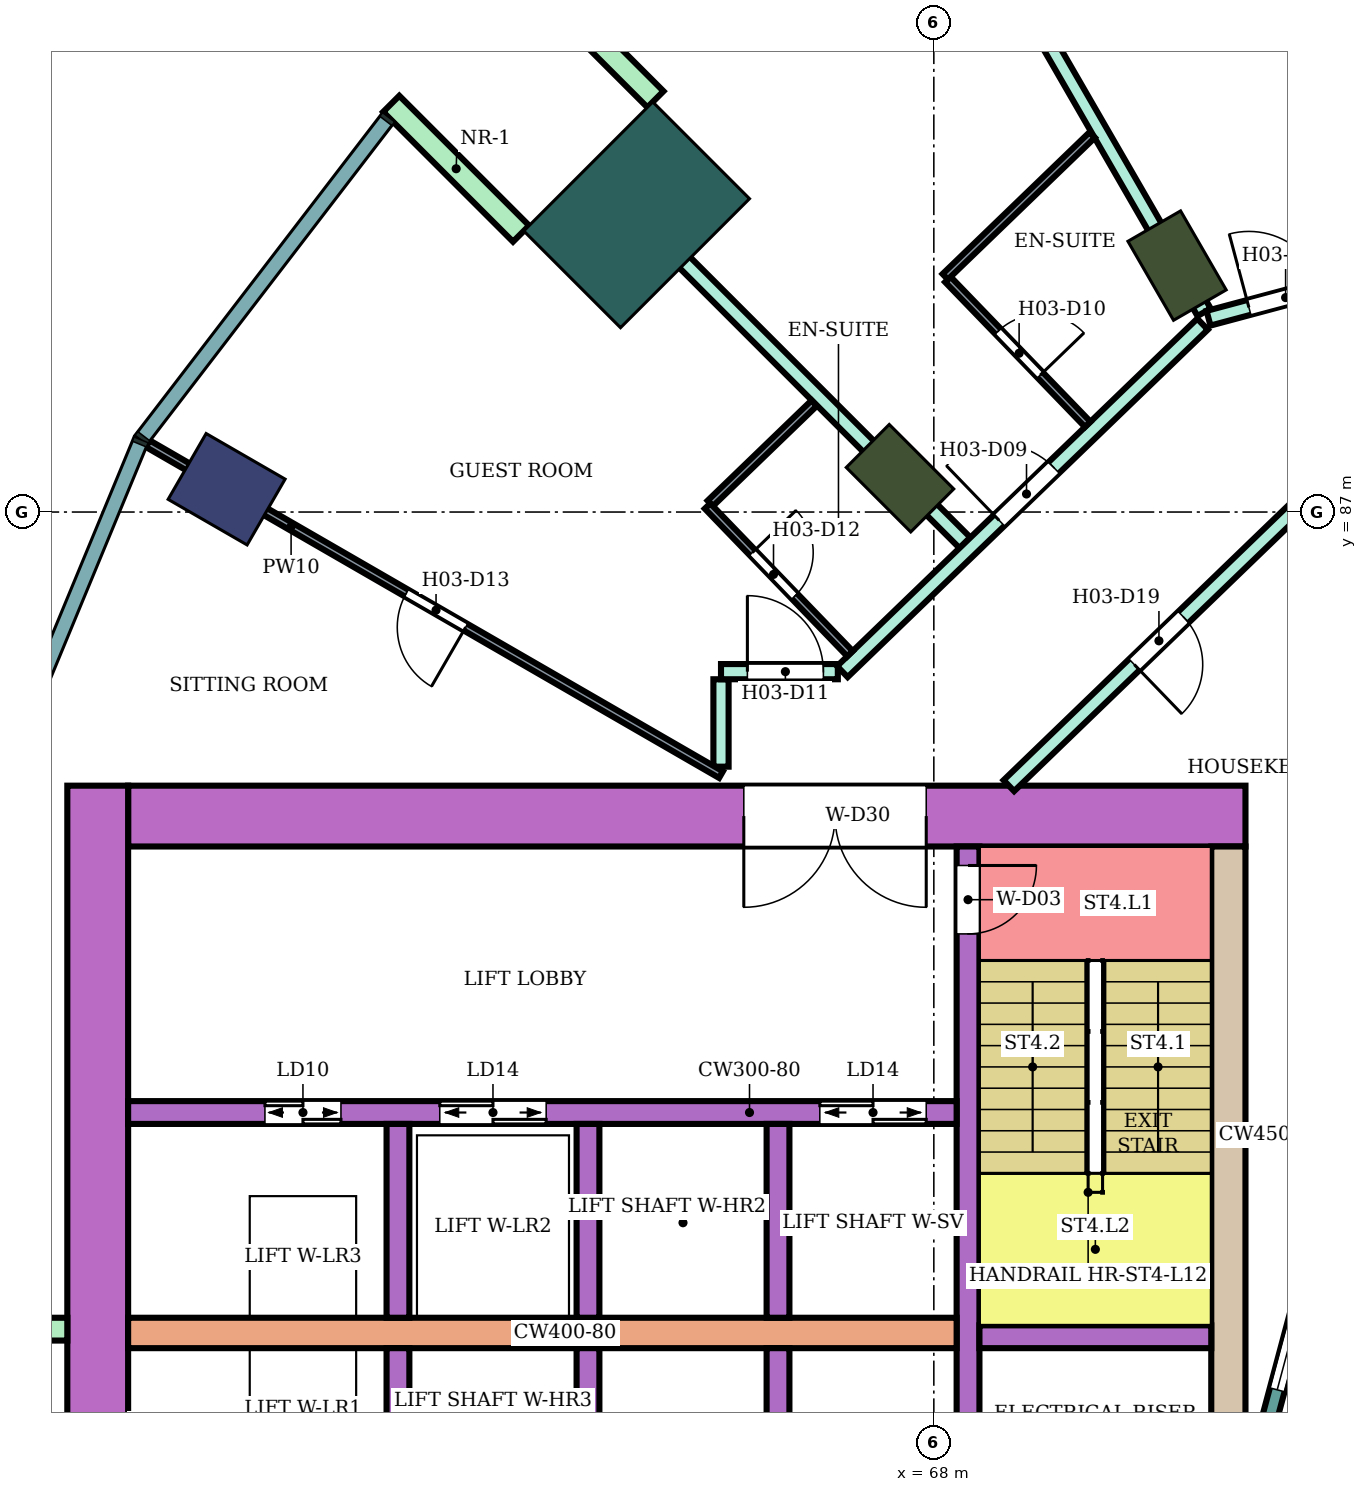
"""IFC4 building model, lengths in metres.
Left out: names, types, materials, properties, quantities, classifications, styles, units other than length and angle.
Written with IfcOpenShell. Run it as: python <this file> out.ifc"""

import sys

from ifc_helpers import new_model, si_unit, direction, frame, frame_2d, origin, origin_2d, place, context, subcontext, project, spatial, rectangle, extrude, element, fill, save


model = new_model("IFC4")
c1 = context("Model", 3, precision=1e-05, world=origin(), true_north=direction((0.0, 1.0)))
c2 = subcontext(c1, "Body", "Model", "MODEL_VIEW")
j1 = project(units=[si_unit("LENGTHUNIT", "METRE"), si_unit("PLANEANGLEUNIT", "RADIAN")], contexts=[c1])
p1 = place(None, origin())
s1 = spatial("IfcSite", under=j1, at=p1, CompositionType="ELEMENT")
p2 = place(p1, origin())
s2 = spatial("IfcBuilding", under=s1, at=p2, CompositionType="ELEMENT")
p3 = place(p2, frame((0.0, 0.0, 55.4)))
s3 = spatial("IfcBuildingStorey", under=s2, at=p3, CompositionType="ELEMENT", Elevation=55.4)
p4 = place(p3, frame((58.696, 87.3, 0.0), z_axis=(0.0, 0.0, 1.0), x_axis=(-0.866025403784, 0.5, 0.0)))
e1 = element("IfcColumn", 1, at=p4, inside=s3, PredefinedType="COLUMN", context=c2, shape_type="SweptSolid", body=[
    extrude(rectangle(XDim=1.2, YDim=1.0, at=origin_2d()), origin(), (0.0, 0.0, 1.0), 3.8),
])
for number, where, z_axis, x_axis in (
    (2, (71.2, 90.242, 0.0), (0.0, 0.0, 1.0), (-0.5, 0.866, 0.0)),
    (3, (67.555, 87.445, 0.0), (0.0, 0.0, 1.0), (-0.707, 0.707, 0.0)),
):
    element("IfcColumn", number, at=place(p3, frame(where, z_axis=z_axis, x_axis=x_axis)), inside=s3, PredefinedType="COLUMN", context=c2, shape_type="SweptSolid", body=[
        extrude(rectangle(XDim=1.2, YDim=0.8, at=origin_2d()), origin(), (0.0, 0.0, 1.0), 3.8),
    ])
p5 = place(p3, frame((64.09, 90.91, 0.0), z_axis=(0.0, 0.0, 1.0), x_axis=(-0.707106781187, 0.707106781187, 0.0)))
e4 = element("IfcColumn", 4, at=p5, inside=s3, PredefinedType="COLUMN", context=c2, shape_type="SweptSolid", body=[
    extrude(rectangle(XDim=1.8, YDim=2.4, at=origin_2d()), origin(), (0.0, 0.0, 1.0), 3.8),
])
p6 = place(p3, frame((72.1, 83.0, 0.0), z_axis=(0.0, 0.0, 1.0), x_axis=(-1.0, 0.0, 0.0)))
e5 = element("IfcWall", 5, at=p6, inside=s3, PredefinedType="SHEAR", context=c2, shape_type="SweptSolid", body=[
    extrude(rectangle(XDim=14.7, YDim=0.8, at=frame_2d((7.35, 0.0))), origin(), (0.0, 0.0, 1.0), 3.48),
])
p7 = place(p6, frame((4.2, 0.0, 0.0)))
e6 = element("IfcOpeningElement", 6, at=p7, cuts=e5, PredefinedType="OPENING", context=c2, shape_type="SweptSolid", body=[
    extrude(rectangle(XDim=2.4, YDim=2.4, at=frame_2d((1.2, 1.2))), frame((0.0, 0.41, 0.0), z_axis=(0.0, -1.0, 0.0), x_axis=(1.0, 0.0, 0.0)), (0.0, 0.0, 1.0), 0.82),
])
p8 = place(p3, frame((71.875, 82.6, 0.0), z_axis=(0.0, 0.0, 1.0), x_axis=(0.0, -1.0, 0.0)))
e7 = element("IfcWall", 7, at=p8, inside=s3, PredefinedType="SHEAR", context=c2, shape_type="SweptSolid", body=[
    extrude(rectangle(XDim=7.6, YDim=0.45, at=frame_2d((3.8, 0.0))), origin(), (0.0, 0.0, 1.0), 3.48),
])
p9 = place(p3, frame((57.0, 83.4, 0.0), z_axis=(0.0, 0.0, 1.0), x_axis=(0.0, -1.0, 0.0)))
e8 = element("IfcWall", 8, at=p9, inside=s3, PredefinedType="SHEAR", context=c2, shape_type="SweptSolid", body=[
    extrude(rectangle(XDim=16.8, YDim=0.8, at=frame_2d((8.4, 0.0))), origin(), (0.0, 0.0, 1.0), 3.48),
])
p10 = place(p3, frame((68.45, 82.6, 0.0), z_axis=(0.0, 0.0, 1.0), x_axis=(0.0, -1.0, 0.0)))
e9 = element("IfcWall", 9, at=p10, inside=s3, PredefinedType="SHEAR", context=c2, shape_type="SweptSolid", body=[
    extrude(rectangle(XDim=7.6, YDim=0.3, at=frame_2d((3.8, 0.0))), origin(), (0.0, 0.0, 1.0), 3.48),
])
p11 = place(p10, frame((0.25, 0.0, 0.0)))
e10 = element("IfcOpeningElement", 10, at=p11, cuts=e9, PredefinedType="OPENING", context=c2, shape_type="SweptSolid", body=[
    extrude(rectangle(XDim=0.9, YDim=2.1, at=frame_2d((0.45, 1.05))), frame((0.0, 0.16, 0.0), z_axis=(0.0, -1.0, 0.0), x_axis=(1.0, 0.0, 0.0)), (0.0, 0.0, 1.0), 0.32),
])
p12 = place(p3, frame((71.65, 76.15, 0.0), z_axis=(0.0, 0.0, 1.0), x_axis=(-1.0, 0.0, 0.0)))
e11 = element("IfcWall", 11, at=p12, inside=s3, PredefinedType="SHEAR", context=c2, shape_type="SweptSolid", body=[
    extrude(rectangle(XDim=3.05, YDim=0.3, at=frame_2d((1.525, 0.0))), origin(), (0.0, 0.0, 1.0), 3.48),
])
p13 = place(p3, frame((68.3, 76.2, 0.0), z_axis=(0.0, 0.0, 1.0), x_axis=(-1.0, 0.0, 0.0)))
e12 = element("IfcWall", 12, at=p13, inside=s3, PredefinedType="SHEAR", context=c2, shape_type="SweptSolid", body=[
    extrude(rectangle(XDim=10.9, YDim=0.4, at=frame_2d((5.45, 0.0))), origin(), (0.0, 0.0, 1.0), 3.48),
])
p14 = place(p3, frame((68.3, 79.1, 0.0), z_axis=(0.0, 0.0, 1.0), x_axis=(-1.0, 0.0, 0.0)))
e13 = element("IfcWall", 13, at=p14, inside=s3, PredefinedType="SHEAR", context=c2, shape_type="SweptSolid", body=[
    extrude(rectangle(XDim=10.9, YDim=0.3, at=frame_2d((5.45, 0.0))), origin(), (0.0, 0.0, 1.0), 3.48),
])
p15 = place(p14, frame((0.4, 0.0, 0.0)))
e14 = element("IfcOpeningElement", 14, at=p15, cuts=e13, PredefinedType="OPENING", context=c2, shape_type="SweptSolid", body=[
    extrude(rectangle(XDim=1.4, YDim=2.1, at=frame_2d((0.7, 1.05))), frame((0.0, 0.16, 0.0), z_axis=(0.0, -1.0, 0.0), x_axis=(1.0, 0.0, 0.0)), (0.0, 0.0, 1.0), 0.32),
])
p16 = place(p14, frame((5.4, 0.0, 0.0)))
e15 = element("IfcOpeningElement", 15, at=p16, cuts=e13, PredefinedType="OPENING", context=c2, shape_type="SweptSolid", body=[
    extrude(rectangle(XDim=1.4, YDim=2.1, at=frame_2d((0.7, 1.05))), frame((0.0, 0.16, 0.0), z_axis=(0.0, -1.0, 0.0), x_axis=(1.0, 0.0, 0.0)), (0.0, 0.0, 1.0), 0.32),
])
p17 = place(p14, frame((8.1, 0.0, 0.0)))
e16 = element("IfcOpeningElement", 16, at=p17, cuts=e13, PredefinedType="OPENING", context=c2, shape_type="SweptSolid", body=[
    extrude(rectangle(XDim=1.0, YDim=2.1, at=frame_2d((0.5, 1.05))), frame((0.0, 0.16, 0.0), z_axis=(0.0, -1.0, 0.0), x_axis=(1.0, 0.0, 0.0)), (0.0, 0.0, 1.0), 0.32),
])
for number, where, z_axis, x_axis in (
    (17, (65.95, 76.0, 0.0), (0.0, 0.0, 1.0), (0.0, -1.0, 0.0)),
    (18, (63.45, 76.0, 0.0), (0.0, 0.0, 1.0), (0.0, -1.0, 0.0)),
    (19, (60.95, 76.0, 0.0), (0.0, 0.0, 1.0), (0.0, -1.0, 0.0)),
    (20, (65.95, 78.95, 0.0), (0.0, 0.0, 1.0), (0.0, -1.0, 0.0)),
    (21, (63.45, 78.95, 0.0), (0.0, 0.0, 1.0), (0.0, -1.0, 0.0)),
    (22, (60.95, 78.95, 0.0), (0.0, 0.0, 1.0), (0.0, -1.0, 0.0)),
):
    element("IfcWall", number, at=place(p3, frame(where, z_axis=z_axis, x_axis=x_axis)), inside=s3, PredefinedType="SHEAR", context=c2, shape_type="SweptSolid", body=[
        extrude(rectangle(XDim=2.55, YDim=0.3, at=frame_2d((1.275, 0.0))), origin(), (0.0, 0.0, 1.0), 3.48),
    ])
for number, where, z_axis, x_axis in (
    (23, (64.338, 92.43, 0.0), (0.0, 0.0, 1.0), (-0.707, 0.707, 0.0)),
    (24, (62.57, 90.662, 0.0), (0.0, 0.0, 1.0), (-0.707, 0.707, 0.0)),
    (25, (56.6, 76.25, 0.0), (0.0, 0.0, 1.0), (-1.0, 0.0, 0.0)),
):
    element("IfcWall", number, at=place(p3, frame(where, z_axis=z_axis, x_axis=x_axis)), inside=s3, PredefinedType="NOTDEFINED", context=c2, shape_type="SweptSolid", body=[
        extrude(rectangle(XDim=2.416, YDim=0.3, at=frame_2d((1.208, 0.0))), origin(), (0.0, 0.0, 1.0), 3.8),
    ])
p18 = place(p3, frame((73.415, 78.802, 0.0), z_axis=(0.0, 0.0, 1.0), x_axis=(-0.258789828301, -0.965933654434, 0.0)))
e26 = element("IfcWall", 26, at=p18, inside=s3, PredefinedType="NOTDEFINED", context=c2, shape_type="SweptSolid", body=[
    extrude(rectangle(XDim=3.936, YDim=0.2, at=frame_2d((1.968, 0.0))), origin(), (0.0, 0.0, 1.0), 3.8),
])
p19 = place(p18, frame((0.468, 0.0, 0.9)))
e27 = element("IfcOpeningElement", 27, at=p19, cuts=e26, PredefinedType="OPENING", context=c2, shape_type="SweptSolid", body=[
    extrude(rectangle(XDim=3.0, YDim=2.3, at=frame_2d((1.5, 1.15))), frame((0.0, 0.11, 0.0), z_axis=(0.0, -1.0, 0.0), x_axis=(1.0, 0.0, 0.0)), (0.0, 0.0, 1.0), 0.22),
])
p20 = place(p3, frame((63.598, 91.408, 0.0), z_axis=(0.0, 0.0, 1.0), x_axis=(0.706999146394, -0.707214399597, 0.0)))
e28 = element("IfcWall", 28, at=p20, inside=s3, PredefinedType="PARTITIONING", context=c2, shape_type="SweptSolid", body=[
    extrude(rectangle(XDim=6.805, YDim=0.2, at=frame_2d((3.403, 0.0))), origin(), (0.0, 0.0, 1.0), 3.35),
])
p21 = place(p3, frame((65.2, 83.65, 0.0), z_axis=(0.0, 0.0, 1.0), x_axis=(0.0, 1.0, 0.0)))
e29 = element("IfcWall", 29, at=p21, inside=s3, PredefinedType="PARTITIONING", context=c2, shape_type="SweptSolid", body=[
    extrude(rectangle(XDim=1.15, YDim=0.2, at=frame_2d((0.575, 0.0))), origin(), (0.0, 0.0, 1.0), 3.35),
])
p22 = place(p3, frame((65.2, 84.9, 0.0), z_axis=(0.0, 0.0, 1.0), x_axis=(1.0, 0.0, 0.0)))
e30 = element("IfcWall", 30, at=p22, inside=s3, PredefinedType="PARTITIONING", context=c2, shape_type="SweptSolid", body=[
    extrude(rectangle(XDim=1.537, YDim=0.2, at=frame_2d((0.769, 0.0))), origin(), (0.0, 0.0, 1.0), 3.35),
])
p23 = place(p22, frame((0.347, 0.0, 0.0)))
e31 = element("IfcOpeningElement", 31, at=p23, cuts=e30, PredefinedType="OPENING", context=c2, shape_type="SweptSolid", body=[
    extrude(rectangle(XDim=1.0, YDim=2.1, at=frame_2d((0.5, 1.05))), frame((0.0, 0.11, 0.0), z_axis=(0.0, -1.0, 0.0), x_axis=(1.0, 0.0, 0.0)), (0.0, 0.0, 1.0), 0.22),
])
p24 = place(p3, frame((66.797, 84.9, 0.0), z_axis=(0.0, 0.0, 1.0), x_axis=(0.719692092412, 0.694293376116, 0.0)))
e32 = element("IfcWall", 32, at=p24, inside=s3, PredefinedType="PARTITIONING", context=c2, shape_type="SweptSolid", body=[
    extrude(rectangle(XDim=6.584, YDim=0.2, at=frame_2d((3.292, 0.0))), origin(), (0.0, 0.0, 1.0), 3.35),
])
p25 = place(p24, frame((2.866, 0.0, 0.0)))
e33 = element("IfcOpeningElement", 33, at=p25, cuts=e32, PredefinedType="OPENING", context=c2, shape_type="SweptSolid", body=[
    extrude(rectangle(XDim=1.0, YDim=2.1, at=frame_2d((0.5, 1.05))), frame((0.0, 0.11, 0.0), z_axis=(0.0, -1.0, 0.0), x_axis=(1.0, 0.0, 0.0)), (0.0, 0.0, 1.0), 0.22),
])
p26 = place(p3, frame((67.103, 97.342, 0.0), z_axis=(0.0, 0.0, 1.0), x_axis=(0.499906738326, -0.866079241742, 0.0)))
e34 = element("IfcWall", 34, at=p26, inside=s3, PredefinedType="PARTITIONING", context=c2, shape_type="SweptSolid", body=[
    extrude(rectangle(XDim=8.907, YDim=0.2, at=frame_2d((4.454, 0.0))), origin(), (0.0, 0.0, 1.0), 3.35),
])
p27 = place(p3, frame((68.987, 83.4, 0.0), z_axis=(0.0, 0.0, 1.0), x_axis=(0.719547721855, 0.694442996922, 0.0)))
e35 = element("IfcWall", 35, at=p27, inside=s3, PredefinedType="PARTITIONING", context=c2, shape_type="SweptSolid", body=[
    extrude(rectangle(XDim=5.378, YDim=0.2, at=frame_2d((2.689, 0.0))), origin(), (0.0, 0.0, 1.0), 3.35),
])
p28 = place(p27, frame((2.294, 0.0, 0.0)))
e36 = element("IfcOpeningElement", 36, at=p28, cuts=e35, PredefinedType="OPENING", context=c2, shape_type="SweptSolid", body=[
    extrude(rectangle(XDim=0.9, YDim=2.1, at=frame_2d((0.45, 1.05))), frame((0.0, 0.11, 0.0), z_axis=(0.0, -1.0, 0.0), x_axis=(1.0, 0.0, 0.0)), (0.0, 0.0, 1.0), 0.22),
])
p29 = place(p3, frame((71.614, 89.55, 0.0), z_axis=(0.0, 0.0, 1.0), x_axis=(0.965967958589, 0.258661753994, 0.0)))
e37 = element("IfcWall", 37, at=p29, inside=s3, PredefinedType="PARTITIONING", context=c2, shape_type="SweptSolid", body=[
    extrude(rectangle(XDim=8.592, YDim=0.2, at=frame_2d((4.296, 0.0))), origin(), (0.0, 0.0, 1.0), 3.35),
])
p30 = place(p29, frame((0.55, 0.0, 0.0)))
e38 = element("IfcOpeningElement", 38, at=p30, cuts=e37, PredefinedType="OPENING", context=c2, shape_type="SweptSolid", body=[
    extrude(rectangle(XDim=1.0, YDim=2.1, at=frame_2d((0.5, 1.05))), frame((0.0, 0.11, 0.0), z_axis=(0.0, -1.0, 0.0), x_axis=(1.0, 0.0, 0.0)), (0.0, 0.0, 1.0), 0.22),
])
p31 = place(p3, frame((57.659, 87.899, 0.0), z_axis=(0.0, 0.0, 1.0), x_axis=(0.86602264145, -0.500004784474, 0.0)))
e39 = element("IfcWall", 39, at=p31, inside=s3, PredefinedType="PARTITIONING", context=c2, shape_type="SweptSolid", body=[
    extrude(rectangle(XDim=8.708, YDim=0.1, at=frame_2d((4.354, 0.0))), origin(), (0.0, 0.0, 1.0), 3.35),
])
p32 = place(p31, frame((3.929, 0.0, 0.0)))
e40 = element("IfcOpeningElement", 40, at=p32, cuts=e39, PredefinedType="OPENING", context=c2, shape_type="SweptSolid", body=[
    extrude(rectangle(XDim=0.9, YDim=2.1, at=frame_2d((0.45, 1.05))), frame((0.0, 0.06, 0.0), z_axis=(0.0, -1.0, 0.0), x_axis=(1.0, 0.0, 0.0)), (0.0, 0.0, 1.0), 0.12),
])
p33 = place(p3, frame((65.059, 87.114, 0.0), z_axis=(0.0, 0.0, 1.0), x_axis=(0.719715847356, 0.694268751324, 0.0)))
e41 = element("IfcWall", 41, at=p33, inside=s3, PredefinedType="PARTITIONING", context=c2, shape_type="SweptSolid", body=[
    extrude(rectangle(XDim=1.9, YDim=0.1, at=frame_2d((0.95, 0.0))), origin(), (0.0, 0.0, 1.0), 3.35),
])
p34 = place(p3, frame((65.023, 87.079, 0.0), z_axis=(0.0, 0.0, 1.0), x_axis=(0.694287838235, -0.719697434815, 0.0)))
e42 = element("IfcWall", 42, at=p34, inside=s3, PredefinedType="PARTITIONING", context=c2, shape_type="SweptSolid", body=[
    extrude(rectangle(XDim=2.7, YDim=0.1, at=frame_2d((1.35, 0.0))), origin(), (0.0, 0.0, 1.0), 3.35),
])
p35 = place(p34, frame((0.85, 0.0, 0.0)))
e43 = element("IfcOpeningElement", 43, at=p35, cuts=e42, PredefinedType="OPENING", context=c2, shape_type="SweptSolid", body=[
    extrude(rectangle(XDim=0.8, YDim=2.1, at=frame_2d((0.4, 1.05))), frame((0.0, 0.06, 0.0), z_axis=(0.0, -1.0, 0.0), x_axis=(1.0, 0.0, 0.0)), (0.0, 0.0, 1.0), 0.12),
])
p36 = place(p3, frame((68.185, 90.06, 0.0), z_axis=(0.0, 0.0, 1.0), x_axis=(0.69446127412, -0.719530081892, 0.0)))
e44 = element("IfcWall", 44, at=p36, inside=s3, PredefinedType="PARTITIONING", context=c2, shape_type="SweptSolid", body=[
    extrude(rectangle(XDim=2.649, YDim=0.1, at=frame_2d((1.324, 0.0))), origin(), (0.0, 0.0, 1.0), 3.35),
])
p37 = place(p36, frame((0.95, 0.0, 0.0)))
e45 = element("IfcOpeningElement", 45, at=p37, cuts=e44, PredefinedType="OPENING", context=c2, shape_type="SweptSolid", body=[
    extrude(rectangle(XDim=0.8, YDim=2.1, at=frame_2d((0.4, 1.05))), frame((0.0, 0.06, 0.0), z_axis=(0.0, -1.0, 0.0), x_axis=(1.0, 0.0, 0.0)), (0.0, 0.0, 1.0), 0.12),
])
p38 = place(p3, frame((68.15, 90.096, 0.0), z_axis=(0.0, 0.0, 1.0), x_axis=(0.719667544954, 0.694318820672, 0.0)))
e46 = element("IfcWall", 46, at=p38, inside=s3, PredefinedType="PARTITIONING", context=c2, shape_type="SweptSolid", body=[
    extrude(rectangle(XDim=2.687, YDim=0.1, at=frame_2d((1.344, 0.0))), origin(), (0.0, 0.0, 1.0), 3.35),
])
p39 = place(p19, origin())
e47 = element("IfcWindow", 47, at=p39, inside=s3, PartitioningType="SINGLE_PANEL", PredefinedType="WINDOW", context=c2, shape_type="SweptSolid", body=[
    extrude(rectangle(XDim=3.0, YDim=2.3, at=frame_2d((1.5, 1.15))), frame((0.0, 0.03, 0.0), z_axis=(0.0, -1.0, 0.0), x_axis=(1.0, 0.0, 0.0)), (0.0, 0.0, 1.0), 0.06),
])
fill(e27, e47)
p40 = place(p30, origin())
e48 = element("IfcDoor", 48, at=p40, inside=s3, OperationType="SINGLE_SWING_LEFT", PredefinedType="DOOR", context=c2, shape_type="SweptSolid", body=[
    extrude(rectangle(XDim=1.0, YDim=2.1, at=frame_2d((0.5, 1.05))), frame((0.0, 0.025, 0.0), z_axis=(0.0, -1.0, 0.0), x_axis=(1.0, 0.0, 0.0)), (0.0, 0.0, 1.0), 0.05),
])
fill(e38, e48)
p41 = place(p25, origin())
e49 = element("IfcDoor", 49, at=p41, inside=s3, OperationType="SINGLE_SWING_LEFT", PredefinedType="DOOR", context=c2, shape_type="SweptSolid", body=[
    extrude(rectangle(XDim=1.0, YDim=2.1, at=frame_2d((0.5, 1.05))), frame((0.0, 0.025, 0.0), z_axis=(0.0, -1.0, 0.0), x_axis=(1.0, 0.0, 0.0)), (0.0, 0.0, 1.0), 0.05),
])
fill(e33, e49)
p42 = place(p37, origin())
e50 = element("IfcDoor", 50, at=p42, inside=s3, OperationType="SINGLE_SWING_RIGHT", PredefinedType="DOOR", context=c2, shape_type="SweptSolid", body=[
    extrude(rectangle(XDim=0.8, YDim=2.1, at=frame_2d((0.4, 1.05))), frame((0.0, 0.025, 0.0), z_axis=(0.0, -1.0, 0.0), x_axis=(1.0, 0.0, 0.0)), (0.0, 0.0, 1.0), 0.05),
])
fill(e45, e50)
p43 = place(p23, origin())
e51 = element("IfcDoor", 51, at=p43, inside=s3, OperationType="SINGLE_SWING_LEFT", PredefinedType="DOOR", context=c2, shape_type="SweptSolid", body=[
    extrude(rectangle(XDim=1.0, YDim=2.1, at=frame_2d((0.5, 1.05))), frame((0.0, 0.025, 0.0), z_axis=(0.0, -1.0, 0.0), x_axis=(1.0, 0.0, 0.0)), (0.0, 0.0, 1.0), 0.05),
])
fill(e31, e51)
p44 = place(p35, origin())
e52 = element("IfcDoor", 52, at=p44, inside=s3, OperationType="SINGLE_SWING_LEFT", PredefinedType="DOOR", context=c2, shape_type="SweptSolid", body=[
    extrude(rectangle(XDim=0.8, YDim=2.1, at=frame_2d((0.4, 1.05))), frame((0.0, 0.025, 0.0), z_axis=(0.0, -1.0, 0.0), x_axis=(1.0, 0.0, 0.0)), (0.0, 0.0, 1.0), 0.05),
])
fill(e43, e52)
p45 = place(p32, frame((0.9, 0.0, 0.0), z_axis=(0.0, 0.0, 1.0), x_axis=(-1.0, 0.0, 0.0)))
e53 = element("IfcDoor", 53, at=p45, inside=s3, OperationType="SINGLE_SWING_LEFT", PredefinedType="DOOR", context=c2, shape_type="SweptSolid", body=[
    extrude(rectangle(XDim=0.9, YDim=2.1, at=frame_2d((0.45, 1.05))), frame((0.0, 0.025, 0.0), z_axis=(0.0, -1.0, 0.0), x_axis=(1.0, 0.0, 0.0)), (0.0, 0.0, 1.0), 0.05),
])
fill(e40, e53)
p46 = place(p28, frame((0.9, 0.0, 0.0), z_axis=(0.0, 0.0, 1.0), x_axis=(-1.0, 0.0, 0.0)))
e54 = element("IfcDoor", 54, at=p46, inside=s3, OperationType="SINGLE_SWING_RIGHT", PredefinedType="DOOR", context=c2, shape_type="SweptSolid", body=[
    extrude(rectangle(XDim=0.9, YDim=2.1, at=frame_2d((0.45, 1.05))), frame((0.0, 0.025, 0.0), z_axis=(0.0, -1.0, 0.0), x_axis=(1.0, 0.0, 0.0)), (0.0, 0.0, 1.0), 0.05),
])
fill(e36, e54)
p47 = place(p11, origin())
e55 = element("IfcDoor", 55, at=p47, inside=s3, OperationType="SINGLE_SWING_LEFT", PredefinedType="DOOR", context=c2, shape_type="SweptSolid", body=[
    extrude(rectangle(XDim=0.9, YDim=2.1, at=frame_2d((0.45, 1.05))), frame((0.0, 0.025, 0.0), z_axis=(0.0, -1.0, 0.0), x_axis=(1.0, 0.0, 0.0)), (0.0, 0.0, 1.0), 0.05),
])
fill(e10, e55)
p48 = place(p15, origin())
e56 = element("IfcDoor", 56, at=p48, inside=s3, OperationType="DOUBLE_DOOR_SLIDING", PredefinedType="DOOR", context=c2, shape_type="SweptSolid", body=[
    extrude(rectangle(XDim=1.4, YDim=2.1, at=frame_2d((0.7, 1.05))), frame((0.0, 0.025, 0.0), z_axis=(0.0, -1.0, 0.0), x_axis=(1.0, 0.0, 0.0)), (0.0, 0.0, 1.0), 0.05),
])
fill(e14, e56)
p49 = place(p16, origin())
e57 = element("IfcDoor", 57, at=p49, inside=s3, OperationType="DOUBLE_DOOR_SLIDING", PredefinedType="DOOR", context=c2, shape_type="SweptSolid", body=[
    extrude(rectangle(XDim=1.4, YDim=2.1, at=frame_2d((0.7, 1.05))), frame((0.0, 0.025, 0.0), z_axis=(0.0, -1.0, 0.0), x_axis=(1.0, 0.0, 0.0)), (0.0, 0.0, 1.0), 0.05),
])
fill(e15, e57)
p50 = place(p17, origin())
e58 = element("IfcDoor", 58, at=p50, inside=s3, OperationType="DOUBLE_DOOR_SLIDING", PredefinedType="DOOR", context=c2, shape_type="SweptSolid", body=[
    extrude(rectangle(XDim=1.0, YDim=2.1, at=frame_2d((0.5, 1.05))), frame((0.0, 0.025, 0.0), z_axis=(0.0, -1.0, 0.0), x_axis=(1.0, 0.0, 0.0)), (0.0, 0.0, 1.0), 0.05),
])
fill(e16, e58)
p51 = place(p7, origin())
e59 = element("IfcDoor", 59, at=p51, inside=s3, OperationType="DOUBLE_DOOR_SINGLE_SWING", PredefinedType="DOOR", context=c2, shape_type="SweptSolid", body=[
    extrude(rectangle(XDim=2.4, YDim=2.4, at=frame_2d((1.2, 1.2))), frame((0.0, 0.025, 0.0), z_axis=(0.0, -1.0, 0.0), x_axis=(1.0, 0.0, 0.0)), (0.0, 0.0, 1.0), 0.05),
])
fill(e6, e59)
save(model, sys.argv[1])
